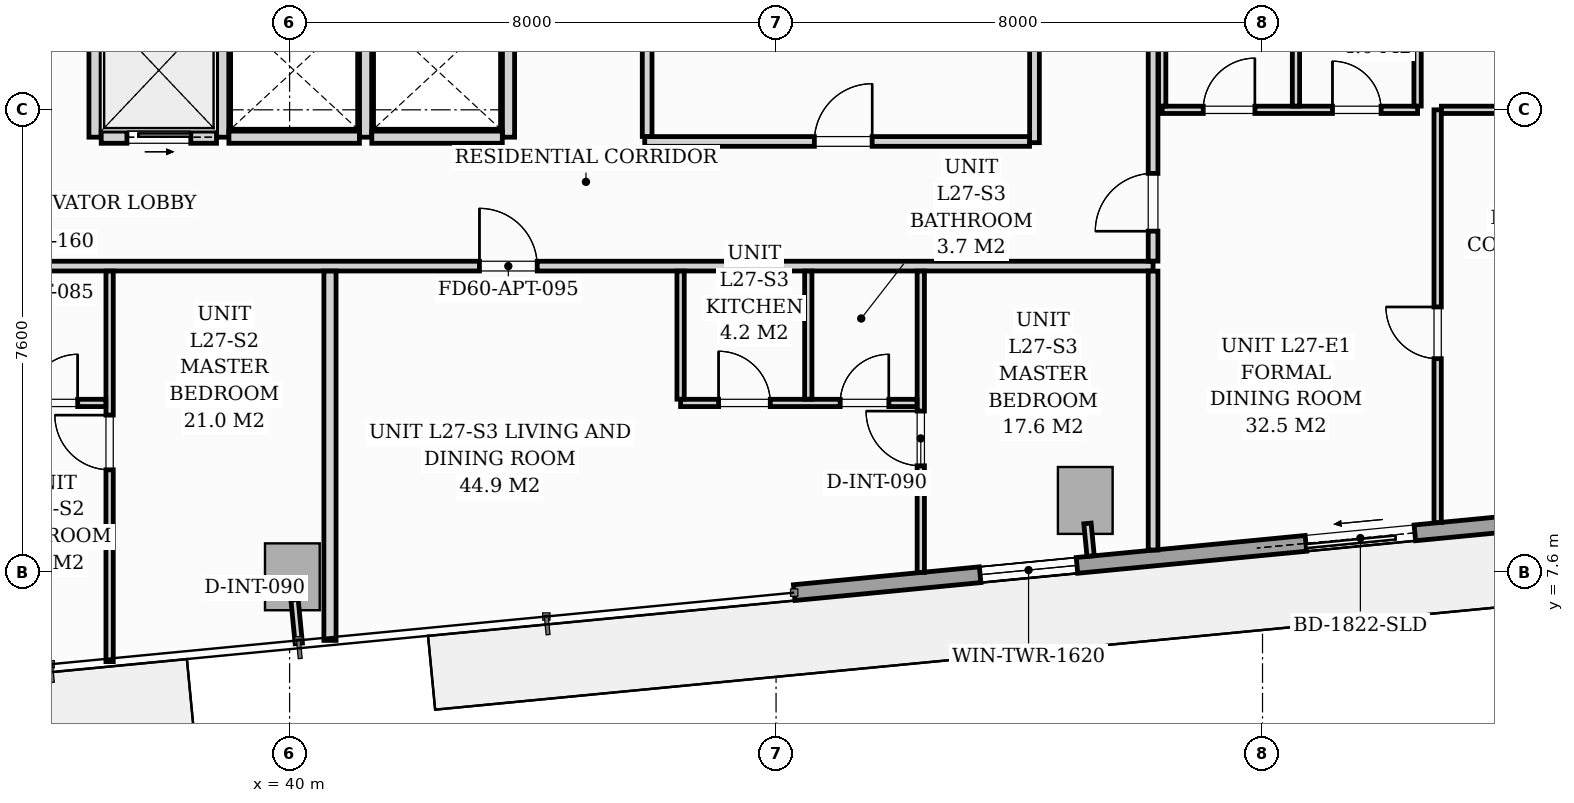
"""IFC4 building model, lengths in metres.
Left out: names, types, materials, properties, quantities, classifications, styles, units other than length and angle.
Written with IfcOpenShell. Run it as: python <this file> out.ifc"""

import sys

from ifc_helpers import new_model, si_unit, direction, frame, frame_2d, origin, origin_2d, place, context, subcontext, project, spatial, rectangle, extrude, source, transform, mapped, element, fill, save


model = new_model("IFC4")
c1 = context("Model", 3, precision=1e-05, world=origin(), true_north=direction((0.0, 1.0)))
c2 = subcontext(c1, "Body", "Model", "MODEL_VIEW")
j1 = project(units=[si_unit("LENGTHUNIT", "METRE"), si_unit("PLANEANGLEUNIT", "RADIAN")], contexts=[c1])
p1 = place(None, origin())
s1 = spatial("IfcSite", under=j1, at=p1, CompositionType="ELEMENT")
p2 = place(p1, origin())
s2 = spatial("IfcBuilding", under=s1, at=p2, CompositionType="ELEMENT")
p3 = place(p2, frame((0.0, 0.0, 97.0)))
s3 = spatial("IfcBuildingStorey", under=s2, at=p3, CompositionType="ELEMENT", Elevation=97.0)
m1 = source(origin(), c2, "Body", "SweptSolid", [
    extrude(rectangle(XDim=0.9, YDim=1.1, at=origin_2d()), origin(), (0.0, 0.0, 1.0), 3.196),
])
for number, where, z_axis, x_axis in (
    (1, (40.045, 7.521, 0.002), (0.0, 0.0, 1.0), (0.995, 0.096, 0.0)),
    (2, (53.085, 8.776, 0.002), (0.0, 0.0, 1.0), (0.995, 0.096, 0.0)),
):
    element("IfcColumn", number, at=place(p3, frame(where, z_axis=z_axis, x_axis=x_axis)), inside=s3, PredefinedType="COLUMN", context=c2, shape_type="MappedRepresentation", body=[
        mapped(m1, transform((0.0, 0.0, 0.0), scale=1.0)),
    ])
p4 = place(p3, frame((67.32, 9.092, 0.0), z_axis=(0.0, 0.0, 1.0), x_axis=(-0.995396521236, -0.095842399342, 0.0)))
e3 = element("IfcWall", 3, at=p4, inside=s3, PredefinedType="STANDARD", context=c2, shape_type="SweptSolid", body=[
    extrude(rectangle(XDim=19.11, YDim=0.26, at=frame_2d((9.555, 0.0))), origin(), (0.0, 0.0, 1.0), 2.94),
])
p5 = place(p4, frame((8.856, 0.0, 0.0)))
e4 = element("IfcOpeningElement", 4, at=p5, cuts=e3, PredefinedType="OPENING", context=c2, shape_type="SweptSolid", body=[
    extrude(rectangle(XDim=1.8, YDim=2.06, at=frame_2d((0.9, 1.03))), frame((0.0, 0.14, 0.0), z_axis=(0.0, -1.0, 0.0), x_axis=(1.0, 0.0, 0.0)), (0.0, 0.0, 1.0), 0.28),
])
p6 = place(p4, frame((2.05, 0.0, 0.65)))
e5 = element("IfcOpeningElement", 5, at=p6, cuts=e3, PredefinedType="OPENING", context=c2, shape_type="SweptSolid", body=[
    extrude(rectangle(XDim=1.6, YDim=1.5, at=frame_2d((0.8, 0.75))), frame((0.0, 0.14, 0.0), z_axis=(0.0, -1.0, 0.0), x_axis=(1.0, 0.0, 0.0)), (0.0, 0.0, 1.0), 0.28),
])
p7 = place(p4, frame((14.438, 0.0, 0.75)))
e6 = element("IfcOpeningElement", 6, at=p7, cuts=e3, PredefinedType="OPENING", context=c2, shape_type="SweptSolid", body=[
    extrude(rectangle(XDim=1.6, YDim=1.5, at=frame_2d((0.8, 0.75))), frame((0.0, 0.14, 0.0), z_axis=(0.0, -1.0, 0.0), x_axis=(1.0, 0.0, 0.0)), (0.0, 0.0, 1.0), 0.28),
])
for number, where, z_axis, x_axis in (
    (7, (36.8, 14.75, 0.0), (0.0, 0.0, 1.0), (0.0, 1.0, 0.0)),
    (8, (38.9, 14.75, 0.0), (0.0, 0.0, 1.0), (0.0, 1.0, 0.0)),
):
    element("IfcWall", number, at=place(p3, frame(where, z_axis=z_axis, x_axis=x_axis)), inside=s3, PredefinedType="PARTITIONING", context=c2, shape_type="SweptSolid", body=[
        extrude(rectangle(XDim=2.3, YDim=0.2, at=frame_2d((1.15, 0.0))), origin(), (0.0, 0.0, 1.0), 2.94),
    ])
p8 = place(p3, frame((36.902, 14.75, 0.0), z_axis=(0.0, 0.0, 1.0), x_axis=(1.0, 0.0, 0.0)))
e9 = element("IfcWall", 9, at=p8, inside=s3, PredefinedType="PARTITIONING", context=c2, shape_type="SweptSolid", body=[
    extrude(rectangle(XDim=1.896, YDim=0.2, at=frame_2d((0.948, 0.0))), origin(), (0.0, 0.0, 1.0), 2.94),
])
p9 = place(p8, frame((0.423, 0.0, 0.0)))
e10 = element("IfcOpeningElement", 10, at=p9, cuts=e9, PredefinedType="OPENING", context=c2, shape_type="SweptSolid", body=[
    extrude(rectangle(XDim=1.05, YDim=2.08, at=frame_2d((0.525, 1.04))), frame((0.0, 0.11, 0.0), z_axis=(0.0, -1.0, 0.0), x_axis=(1.0, 0.0, 0.0)), (0.0, 0.0, 1.0), 0.22),
])
for number, where, z_axis, x_axis in (
    (11, (41.25, 14.75, 0.0), (0.0, 0.0, 1.0), (0.0, 1.0, 0.0)),
    (12, (43.6, 14.75, 0.0), (0.0, 0.0, 1.0), (0.0, 1.0, 0.0)),
):
    element("IfcWall", number, at=place(p3, frame(where, z_axis=z_axis, x_axis=x_axis)), inside=s3, PredefinedType="PARTITIONING", context=c2, shape_type="SweptSolid", body=[
        extrude(rectangle(XDim=2.3, YDim=0.2, at=frame_2d((1.15, 0.0))), origin(), (0.0, 0.0, 1.0), 2.94),
    ])
for number, where, z_axis, x_axis in (
    (13, (39.002, 14.75, 0.0), (0.0, 0.0, 1.0), (1.0, 0.0, 0.0)),
    (14, (41.352, 14.75, 0.0), (0.0, 0.0, 1.0), (1.0, 0.0, 0.0)),
):
    element("IfcWall", number, at=place(p3, frame(where, z_axis=z_axis, x_axis=x_axis)), inside=s3, PredefinedType="PARTITIONING", context=c2, shape_type="SweptSolid", body=[
        extrude(rectangle(XDim=2.146, YDim=0.2, at=frame_2d((1.073, 0.0))), origin(), (0.0, 0.0, 1.0), 2.94),
    ])
p10 = place(p3, frame((16.6, 12.63, 0.0), z_axis=(0.0, 0.0, 1.0), x_axis=(1.0, 0.0, 0.0)))
e15 = element("IfcWall", 15, at=p10, inside=s3, PredefinedType="PARTITIONING", context=c2, shape_type="SweptSolid", body=[
    extrude(rectangle(XDim=37.6, YDim=0.16, at=frame_2d((18.8, 0.0))), origin(), (0.0, 0.0, 1.0), 2.94),
])
p11 = place(p10, frame((1.626, 0.0, 0.0)))
e16 = element("IfcOpeningElement", 16, at=p11, cuts=e15, PredefinedType="OPENING", context=c2, shape_type="SweptSolid", body=[
    extrude(rectangle(XDim=0.95, YDim=2.06, at=frame_2d((0.475, 1.03))), frame((0.0, 0.09, 0.0), z_axis=(0.0, -1.0, 0.0), x_axis=(1.0, 0.0, 0.0)), (0.0, 0.0, 1.0), 0.18),
])
p12 = place(p10, frame((13.46, 0.0, 0.0)))
e17 = element("IfcOpeningElement", 17, at=p12, cuts=e15, PredefinedType="OPENING", context=c2, shape_type="SweptSolid", body=[
    extrude(rectangle(XDim=0.95, YDim=2.06, at=frame_2d((0.475, 1.03))), frame((0.0, 0.09, 0.0), z_axis=(0.0, -1.0, 0.0), x_axis=(1.0, 0.0, 0.0)), (0.0, 0.0, 1.0), 0.18),
])
p13 = place(p10, frame((26.522, 0.0, 0.0)))
e18 = element("IfcOpeningElement", 18, at=p13, cuts=e15, PredefinedType="OPENING", context=c2, shape_type="SweptSolid", body=[
    extrude(rectangle(XDim=0.95, YDim=2.06, at=frame_2d((0.475, 1.03))), frame((0.0, 0.09, 0.0), z_axis=(0.0, -1.0, 0.0), x_axis=(1.0, 0.0, 0.0)), (0.0, 0.0, 1.0), 0.18),
])
p14 = place(p3, frame((54.2, 7.961, 0.0), z_axis=(0.0, 0.0, 1.0), x_axis=(0.0, 1.0, 0.0)))
e19 = element("IfcWall", 19, at=p14, inside=s3, PredefinedType="PARTITIONING", context=c2, shape_type="SweptSolid", body=[
    extrude(rectangle(XDim=4.587, YDim=0.16, at=frame_2d((2.293, 0.0))), origin(), (0.0, 0.0, 1.0), 2.94),
])
p15 = place(p3, frame((54.2, 12.712, 0.0), z_axis=(0.0, 0.0, 1.0), x_axis=(0.0, 1.0, 0.0)))
e20 = element("IfcWall", 20, at=p15, inside=s3, PredefinedType="PARTITIONING", context=c2, shape_type="SweptSolid", body=[
    extrude(rectangle(XDim=14.815, YDim=0.16, at=frame_2d((7.408, 0.0))), origin(), (0.0, 0.0, 1.0), 2.94),
])
p16 = place(p15, frame((0.493, 0.0, 0.0)))
e21 = element("IfcOpeningElement", 21, at=p16, cuts=e20, PredefinedType="OPENING", context=c2, shape_type="SweptSolid", body=[
    extrude(rectangle(XDim=0.95, YDim=2.06, at=frame_2d((0.475, 1.03))), frame((0.0, 0.09, 0.0), z_axis=(0.0, -1.0, 0.0), x_axis=(1.0, 0.0, 0.0)), (0.0, 0.0, 1.0), 0.18),
])
p17 = place(p15, frame((5.433, 0.0, 0.0)))
e22 = element("IfcOpeningElement", 22, at=p17, cuts=e20, PredefinedType="OPENING", context=c2, shape_type="SweptSolid", body=[
    extrude(rectangle(XDim=0.85, YDim=2.0, at=frame_2d((0.425, 1.0))), frame((0.0, 0.09, 0.0), z_axis=(0.0, -1.0, 0.0), x_axis=(1.0, 0.0, 0.0)), (0.0, 0.0, 1.0), 0.18),
])
p18 = place(p3, frame((37.04, 6.126, 0.0), z_axis=(0.0, 0.0, 1.0), x_axis=(0.0, 1.0, 0.0)))
e23 = element("IfcWall", 23, at=p18, inside=s3, PredefinedType="PARTITIONING", context=c2, shape_type="SweptSolid", body=[
    extrude(rectangle(XDim=6.422, YDim=0.12, at=frame_2d((3.211, 0.0))), origin(), (0.0, 0.0, 1.0), 2.94),
])
p19 = place(p18, frame((3.154, 0.0, 0.0)))
e24 = element("IfcOpeningElement", 24, at=p19, cuts=e23, PredefinedType="OPENING", context=c2, shape_type="SweptSolid", body=[
    extrude(rectangle(XDim=0.9, YDim=2.05, at=frame_2d((0.45, 1.025))), frame((0.0, 0.07, 0.0), z_axis=(0.0, -1.0, 0.0), x_axis=(1.0, 0.0, 0.0)), (0.0, 0.0, 1.0), 0.14),
])
p20 = place(p3, frame((33.09, 10.38, 0.0), z_axis=(0.0, 0.0, 1.0), x_axis=(1.0, 0.0, 0.0)))
e25 = element("IfcWall", 25, at=p20, inside=s3, PredefinedType="PARTITIONING", context=c2, shape_type="SweptSolid", body=[
    extrude(rectangle(XDim=3.888, YDim=0.12, at=frame_2d((1.944, 0.0))), origin(), (0.0, 0.0, 1.0), 2.94),
])
p21 = place(p20, frame((0.625, 0.0, 0.0)))
e26 = element("IfcOpeningElement", 26, at=p21, cuts=e25, PredefinedType="OPENING", context=c2, shape_type="SweptSolid", body=[
    extrude(rectangle(XDim=0.85, YDim=2.05, at=frame_2d((0.425, 1.025))), frame((0.0, 0.07, 0.0), z_axis=(0.0, -1.0, 0.0), x_axis=(1.0, 0.0, 0.0)), (0.0, 0.0, 1.0), 0.14),
])
p22 = place(p20, frame((2.625, 0.0, 0.0)))
e27 = element("IfcOpeningElement", 27, at=p22, cuts=e25, PredefinedType="OPENING", context=c2, shape_type="SweptSolid", body=[
    extrude(rectangle(XDim=0.8, YDim=2.02, at=frame_2d((0.4, 1.01))), frame((0.0, 0.07, 0.0), z_axis=(0.0, -1.0, 0.0), x_axis=(1.0, 0.0, 0.0)), (0.0, 0.0, 1.0), 0.14),
])
p23 = place(p3, frame((40.664, 6.475, 0.0), z_axis=(0.0, 0.0, 1.0), x_axis=(0.0, 1.0, 0.0)))
e28 = element("IfcWall", 28, at=p23, inside=s3, PredefinedType="PARTITIONING", context=c2, shape_type="SweptSolid", body=[
    extrude(rectangle(XDim=6.073, YDim=0.2, at=frame_2d((3.037, 0.0))), origin(), (0.0, 0.0, 1.0), 2.94),
])
p24 = place(p3, frame((50.38, 7.594, 0.0), z_axis=(0.0, 0.0, 1.0), x_axis=(0.0, 1.0, 0.0)))
e29 = element("IfcWall", 29, at=p24, inside=s3, PredefinedType="PARTITIONING", context=c2, shape_type="SweptSolid", body=[
    extrude(rectangle(XDim=4.955, YDim=0.12, at=frame_2d((2.477, 0.0))), origin(), (0.0, 0.0, 1.0), 2.94),
])
p25 = place(p24, frame((1.752, 0.0, 0.0)))
e30 = element("IfcOpeningElement", 30, at=p25, cuts=e29, PredefinedType="OPENING", context=c2, shape_type="SweptSolid", body=[
    extrude(rectangle(XDim=0.9, YDim=2.05, at=frame_2d((0.45, 1.025))), frame((0.0, 0.07, 0.0), z_axis=(0.0, -1.0, 0.0), x_axis=(1.0, 0.0, 0.0)), (0.0, 0.0, 1.0), 0.14),
])
p26 = place(p3, frame((46.43, 10.38, 0.0), z_axis=(0.0, 0.0, 1.0), x_axis=(1.0, 0.0, 0.0)))
e31 = element("IfcWall", 31, at=p26, inside=s3, PredefinedType="PARTITIONING", context=c2, shape_type="SweptSolid", body=[
    extrude(rectangle(XDim=3.888, YDim=0.12, at=frame_2d((1.944, 0.0))), origin(), (0.0, 0.0, 1.0), 2.94),
])
p27 = place(p26, frame((0.625, 0.0, 0.0)))
e32 = element("IfcOpeningElement", 32, at=p27, cuts=e31, PredefinedType="OPENING", context=c2, shape_type="SweptSolid", body=[
    extrude(rectangle(XDim=0.85, YDim=2.05, at=frame_2d((0.425, 1.025))), frame((0.0, 0.07, 0.0), z_axis=(0.0, -1.0, 0.0), x_axis=(1.0, 0.0, 0.0)), (0.0, 0.0, 1.0), 0.14),
])
p28 = place(p26, frame((2.625, 0.0, 0.0)))
e33 = element("IfcOpeningElement", 33, at=p28, cuts=e31, PredefinedType="OPENING", context=c2, shape_type="SweptSolid", body=[
    extrude(rectangle(XDim=0.8, YDim=2.02, at=frame_2d((0.4, 1.01))), frame((0.0, 0.07, 0.0), z_axis=(0.0, -1.0, 0.0), x_axis=(1.0, 0.0, 0.0)), (0.0, 0.0, 1.0), 0.14),
])
for number, where, z_axis, x_axis in (
    (34, (48.53, 10.442, 0.0), (0.0, 0.0, 1.0), (0.0, 1.0, 0.0)),
    (35, (46.43, 10.442, 0.0), (0.0, 0.0, 1.0), (0.0, 1.0, 0.0)),
):
    element("IfcWall", number, at=place(p3, frame(where, z_axis=z_axis, x_axis=x_axis)), inside=s3, PredefinedType="PARTITIONING", context=c2, shape_type="SweptSolid", body=[
        extrude(rectangle(XDim=2.106, YDim=0.12, at=frame_2d((1.053, 0.0))), origin(), (0.0, 0.0, 1.0), 2.94),
    ])
p29 = place(p3, frame((54.35, 15.2, 0.0), z_axis=(0.0, 0.0, 1.0), x_axis=(1.0, 0.0, 0.0)))
e36 = element("IfcWall", 36, at=p29, inside=s3, PredefinedType="PARTITIONING", context=c2, shape_type="SweptSolid", body=[
    extrude(rectangle(XDim=4.2, YDim=0.12, at=frame_2d((2.1, 0.0))), origin(), (0.0, 0.0, 1.0), 2.94),
])
p30 = place(p29, frame((0.675, 0.0, 0.0)))
e37 = element("IfcOpeningElement", 37, at=p30, cuts=e36, PredefinedType="OPENING", context=c2, shape_type="SweptSolid", body=[
    extrude(rectangle(XDim=0.85, YDim=2.05, at=frame_2d((0.425, 1.025))), frame((0.0, 0.07, 0.0), z_axis=(0.0, -1.0, 0.0), x_axis=(1.0, 0.0, 0.0)), (0.0, 0.0, 1.0), 0.14),
])
p31 = place(p29, frame((2.8, 0.0, 0.0)))
e38 = element("IfcOpeningElement", 38, at=p31, cuts=e36, PredefinedType="OPENING", context=c2, shape_type="SweptSolid", body=[
    extrude(rectangle(XDim=0.8, YDim=2.02, at=frame_2d((0.4, 1.01))), frame((0.0, 0.07, 0.0), z_axis=(0.0, -1.0, 0.0), x_axis=(1.0, 0.0, 0.0)), (0.0, 0.0, 1.0), 0.14),
])
for number, where, z_axis, x_axis in (
    (39, (54.35, 15.262, 0.0), (0.0, 0.0, 1.0), (0.0, 1.0, 0.0)),
    (40, (56.55, 15.262, 0.0), (0.0, 0.0, 1.0), (0.0, 1.0, 0.0)),
    (41, (58.55, 15.262, 0.0), (0.0, 0.0, 1.0), (0.0, 1.0, 0.0)),
):
    element("IfcWall", number, at=place(p3, frame(where, z_axis=z_axis, x_axis=x_axis)), inside=s3, PredefinedType="PARTITIONING", context=c2, shape_type="SweptSolid", body=[
        extrude(rectangle(XDim=2.186, YDim=0.12, at=frame_2d((1.093, 0.0))), origin(), (0.0, 0.0, 1.0), 2.94),
    ])
p32 = place(p3, frame((58.88, 8.412, 0.0), z_axis=(0.0, 0.0, 1.0), x_axis=(0.0, 1.0, 0.0)))
e42 = element("IfcWall", 42, at=p32, inside=s3, PredefinedType="PARTITIONING", context=c2, shape_type="SweptSolid", body=[
    extrude(rectangle(XDim=6.788, YDim=0.12, at=frame_2d((3.394, 0.0))), origin(), (0.0, 0.0, 1.0), 2.94),
])
p33 = place(p32, frame((2.696, 0.0, 0.0)))
e43 = element("IfcOpeningElement", 43, at=p33, cuts=e42, PredefinedType="OPENING", context=c2, shape_type="SweptSolid", body=[
    extrude(rectangle(XDim=0.85, YDim=2.05, at=frame_2d((0.425, 1.025))), frame((0.0, 0.07, 0.0), z_axis=(0.0, -1.0, 0.0), x_axis=(1.0, 0.0, 0.0)), (0.0, 0.0, 1.0), 0.14),
])
p34 = place(p3, frame((58.942, 15.2, 0.0), z_axis=(0.0, 0.0, 1.0), x_axis=(1.0, 0.0, 0.0)))
e44 = element("IfcWall", 44, at=p34, inside=s3, PredefinedType="PARTITIONING", context=c2, shape_type="SweptSolid", body=[
    extrude(rectangle(XDim=3.532, YDim=0.12, at=frame_2d((1.766, 0.0))), origin(), (0.0, 0.0, 1.0), 2.94),
])
p35 = place(p3, frame((52.25, 14.66, 0.0), z_axis=(0.0, 0.0, 1.0), x_axis=(0.0, 1.0, 0.0)))
e45 = element("IfcWall", 45, at=p35, inside=s3, PredefinedType="PARTITIONING", context=c2, shape_type="SweptSolid", body=[
    extrude(rectangle(XDim=5.99, YDim=0.16, at=frame_2d((2.995, 0.0))), origin(), (0.0, 0.0, 1.0), 2.94),
])
p36 = place(p3, frame((45.84, 14.68, 0.0), z_axis=(0.0, 0.0, 1.0), x_axis=(1.0, 0.0, 0.0)))
e46 = element("IfcWall", 46, at=p36, inside=s3, PredefinedType="PARTITIONING", context=c2, shape_type="SweptSolid", body=[
    extrude(rectangle(XDim=6.328, YDim=0.16, at=frame_2d((3.164, 0.0))), origin(), (0.0, 0.0, 1.0), 2.94),
])
p37 = place(p36, frame((2.79, 0.0, 0.0)))
e47 = element("IfcOpeningElement", 47, at=p37, cuts=e46, PredefinedType="OPENING", context=c2, shape_type="SweptSolid", body=[
    extrude(rectangle(XDim=0.95, YDim=2.06, at=frame_2d((0.475, 1.03))), frame((0.0, 0.09, 0.0), z_axis=(0.0, -1.0, 0.0), x_axis=(1.0, 0.0, 0.0)), (0.0, 0.0, 1.0), 0.18),
])
p38 = place(p3, frame((45.88, 14.762, 0.0), z_axis=(0.0, 0.0, 1.0), x_axis=(0.0, 1.0, 0.0)))
e48 = element("IfcWall", 48, at=p38, inside=s3, PredefinedType="PARTITIONING", context=c2, shape_type="SweptSolid", body=[
    extrude(rectangle(XDim=2.336, YDim=0.16, at=frame_2d((1.168, 0.0))), origin(), (0.0, 0.0, 1.0), 2.94),
])
p39 = place(p3, frame((40.082, 7.142, 0.0), z_axis=(0.0, 0.0, 1.0), x_axis=(0.095944965663, -0.995386640238, 0.0)))
e49 = element("IfcWall", 49, at=p39, inside=s3, PredefinedType="PARTITIONING", context=c2, shape_type="SweptSolid", body=[
    extrude(rectangle(XDim=0.72, YDim=0.12, at=frame_2d((0.36, 0.0))), origin(), (0.0, 0.0, 1.0), 2.94),
])
p40 = place(p3, frame((53.121, 8.398, 0.0), z_axis=(0.0, 0.0, 1.0), x_axis=(0.096179204763, -0.995364034196, 0.0)))
e50 = element("IfcWall", 50, at=p40, inside=s3, PredefinedType="PARTITIONING", context=c2, shape_type="SweptSolid", body=[
    extrude(rectangle(XDim=0.538, YDim=0.12, at=frame_2d((0.269, 0.0))), origin(), (0.0, 0.0, 1.0), 2.94),
])
m2 = source(origin(), c2, "Body", "SweptSolid", [
    extrude(rectangle(XDim=1.8, YDim=2.06, at=frame_2d((0.9, 1.03))), frame((0.0, 0.025, 0.0), z_axis=(0.0, -1.0, 0.0), x_axis=(1.0, 0.0, 0.0)), (0.0, 0.0, 1.0), 0.05),
])
p41 = place(p5, origin())
e51 = element("IfcDoor", 51, at=p41, inside=s3, OperationType="SLIDING_TO_RIGHT", PredefinedType="DOOR", context=c2, shape_type="MappedRepresentation", body=[
    mapped(m2, transform((0.0, 0.0, 0.0), scale=1.0)),
])
fill(e4, e51)
m3 = source(origin(), c2, "Body", "SweptSolid", [
    extrude(rectangle(XDim=1.6, YDim=1.5, at=frame_2d((0.8, 0.75))), frame((0.0, 0.03, 0.0), z_axis=(0.0, -1.0, 0.0), x_axis=(1.0, 0.0, 0.0)), (0.0, 0.0, 1.0), 0.06),
])
p42 = place(p7, origin())
e52 = element("IfcWindow", 52, at=p42, inside=s3, PartitioningType="SINGLE_PANEL", PredefinedType="WINDOW", context=c2, shape_type="MappedRepresentation", body=[
    mapped(m3, transform((0.0, 0.0, 0.0), scale=1.0)),
])
fill(e6, e52)
m4 = source(origin(), c2, "Body", "SweptSolid", [
    extrude(rectangle(XDim=1.05, YDim=2.08, at=frame_2d((0.525, 1.04))), frame((0.0, 0.025, 0.0), z_axis=(0.0, -1.0, 0.0), x_axis=(1.0, 0.0, 0.0)), (0.0, 0.0, 1.0), 0.05),
])
p43 = place(p9, origin())
e53 = element("IfcDoor", 53, at=p43, inside=s3, OperationType="SLIDING_TO_RIGHT", PredefinedType="DOOR", context=c2, shape_type="MappedRepresentation", body=[
    mapped(m4, transform((0.0, 0.0, 0.0), scale=1.0)),
])
fill(e10, e53)
m5 = source(origin(), c2, "Body", "SweptSolid", [
    extrude(rectangle(XDim=0.9, YDim=2.05, at=frame_2d((0.45, 1.025))), frame((0.0, 0.025, 0.0), z_axis=(0.0, -1.0, 0.0), x_axis=(1.0, 0.0, 0.0)), (0.0, 0.0, 1.0), 0.05),
])
p44 = place(p19, origin())
e54 = element("IfcDoor", 54, at=p44, inside=s3, OperationType="SINGLE_SWING_RIGHT", PredefinedType="DOOR", context=c2, shape_type="MappedRepresentation", body=[
    mapped(m5, transform((0.0, 0.0, 0.0), scale=1.0)),
])
fill(e24, e54)
m6 = source(origin(), c2, "Body", "SweptSolid", [
    extrude(rectangle(XDim=0.8, YDim=2.02, at=frame_2d((0.4, 1.01))), frame((0.0, 0.025, 0.0), z_axis=(0.0, -1.0, 0.0), x_axis=(1.0, 0.0, 0.0)), (0.0, 0.0, 1.0), 0.05),
])
p45 = place(p22, origin())
e55 = element("IfcDoor", 55, at=p45, inside=s3, OperationType="SINGLE_SWING_RIGHT", PredefinedType="DOOR", context=c2, shape_type="MappedRepresentation", body=[
    mapped(m6, transform((0.0, 0.0, 0.0), scale=1.0)),
])
fill(e27, e55)
m7 = source(origin(), c2, "Body", "SweptSolid", [
    extrude(rectangle(XDim=0.95, YDim=2.06, at=frame_2d((0.475, 1.03))), frame((0.0, 0.025, 0.0), z_axis=(0.0, -1.0, 0.0), x_axis=(1.0, 0.0, 0.0)), (0.0, 0.0, 1.0), 0.05),
])
p46 = place(p13, origin())
e56 = element("IfcDoor", 56, at=p46, inside=s3, OperationType="SINGLE_SWING_LEFT", PredefinedType="DOOR", context=c2, shape_type="MappedRepresentation", body=[
    mapped(m7, transform((0.0, 0.0, 0.0), scale=1.0)),
])
fill(e18, e56)
p47 = place(p25, origin())
e57 = element("IfcDoor", 57, at=p47, inside=s3, OperationType="SINGLE_SWING_RIGHT", PredefinedType="DOOR", context=c2, shape_type="MappedRepresentation", body=[
    mapped(m5, transform((0.0, 0.0, 0.0), scale=1.0)),
])
fill(e30, e57)
m8 = source(origin(), c2, "Body", "SweptSolid", [
    extrude(rectangle(XDim=0.85, YDim=2.05, at=frame_2d((0.425, 1.025))), frame((0.0, 0.025, 0.0), z_axis=(0.0, -1.0, 0.0), x_axis=(1.0, 0.0, 0.0)), (0.0, 0.0, 1.0), 0.05),
])
p48 = place(p27, origin())
e58 = element("IfcDoor", 58, at=p48, inside=s3, OperationType="SINGLE_SWING_LEFT", PredefinedType="DOOR", context=c2, shape_type="MappedRepresentation", body=[
    mapped(m8, transform((0.0, 0.0, 0.0), scale=1.0)),
])
fill(e32, e58)
p49 = place(p28, origin())
e59 = element("IfcDoor", 59, at=p49, inside=s3, OperationType="SINGLE_SWING_RIGHT", PredefinedType="DOOR", context=c2, shape_type="MappedRepresentation", body=[
    mapped(m6, transform((0.0, 0.0, 0.0), scale=1.0)),
])
fill(e33, e59)
p50 = place(p16, origin())
e60 = element("IfcDoor", 60, at=p50, inside=s3, OperationType="SINGLE_SWING_LEFT", PredefinedType="DOOR", context=c2, shape_type="MappedRepresentation", body=[
    mapped(m7, transform((0.0, 0.0, 0.0), scale=1.0)),
])
fill(e21, e60)
p51 = place(p33, origin())
e61 = element("IfcDoor", 61, at=p51, inside=s3, OperationType="SINGLE_SWING_RIGHT", PredefinedType="DOOR", context=c2, shape_type="MappedRepresentation", body=[
    mapped(m8, transform((0.0, 0.0, 0.0), scale=1.0)),
])
fill(e43, e61)
p52 = place(p30, origin())
e62 = element("IfcDoor", 62, at=p52, inside=s3, OperationType="SINGLE_SWING_RIGHT", PredefinedType="DOOR", context=c2, shape_type="MappedRepresentation", body=[
    mapped(m8, transform((0.0, 0.0, 0.0), scale=1.0)),
])
fill(e37, e62)
p53 = place(p31, origin())
e63 = element("IfcDoor", 63, at=p53, inside=s3, OperationType="SINGLE_SWING_LEFT", PredefinedType="DOOR", context=c2, shape_type="MappedRepresentation", body=[
    mapped(m6, transform((0.0, 0.0, 0.0), scale=1.0)),
])
fill(e38, e63)
p54 = place(p37, origin())
e64 = element("IfcDoor", 64, at=p54, inside=s3, OperationType="SINGLE_SWING_RIGHT", PredefinedType="DOOR", context=c2, shape_type="MappedRepresentation", body=[
    mapped(m7, transform((0.0, 0.0, 0.0), scale=1.0)),
])
fill(e47, e64)
save(model, sys.argv[1])
